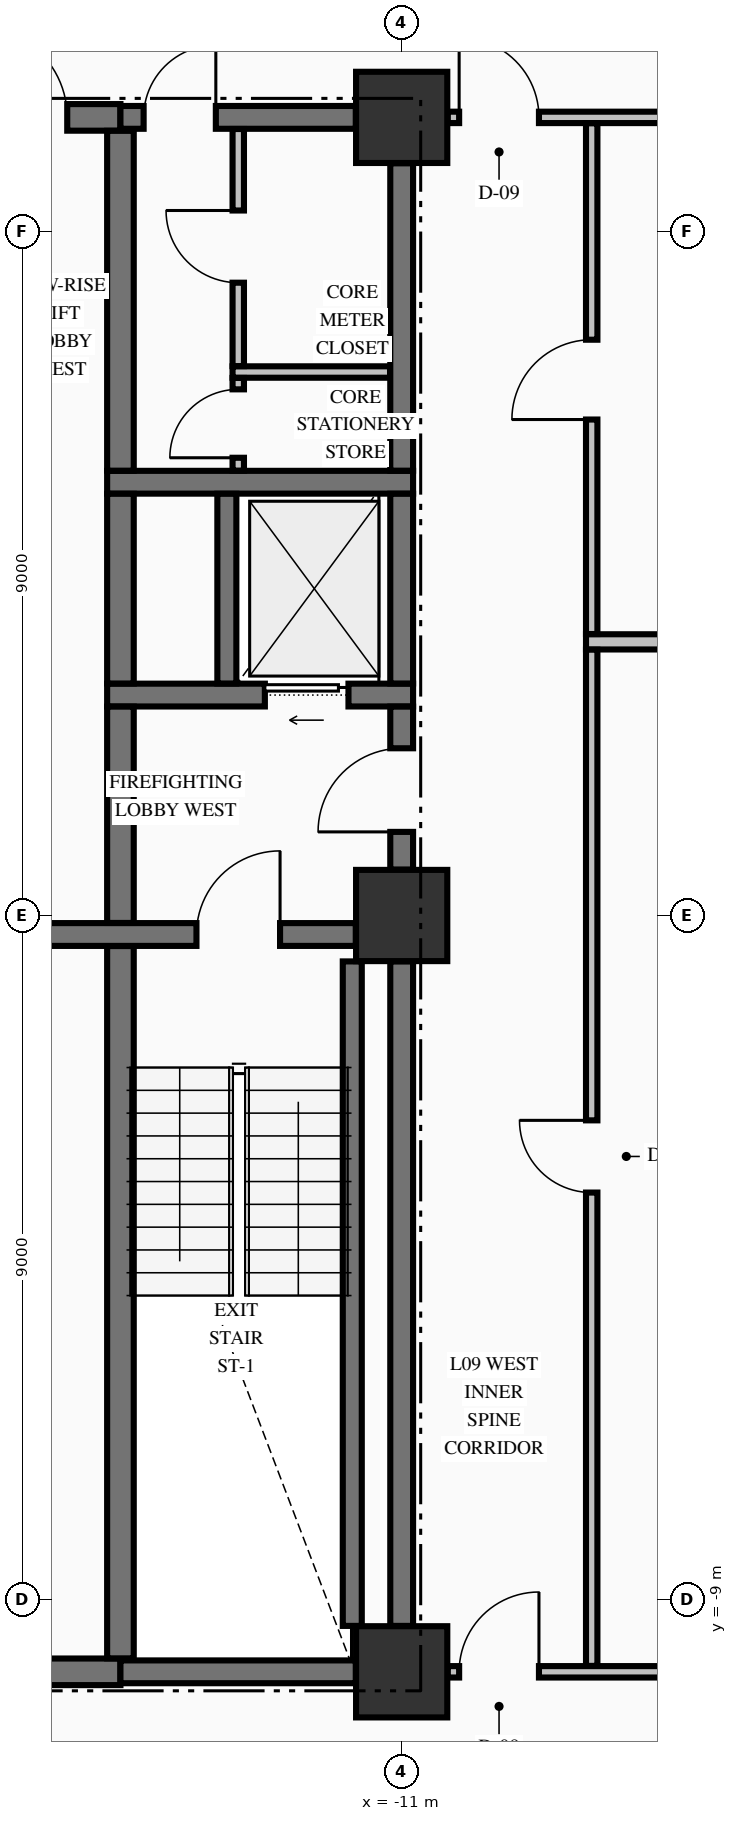
"""IFC4 building model, lengths in metres.
Left out: names, types, materials, properties, quantities, classifications, styles, units other than length and angle.
Written with IfcOpenShell. Run it as: python <this file> out.ifc"""

import sys

from ifc_helpers import new_model, si_unit, direction, frame, frame_2d, origin, origin_2d, place, context, subcontext, project, spatial, rectangle, extrude, element, fill, save


model = new_model("IFC4")
c1 = context("Model", 3, precision=1e-05, world=origin(), true_north=direction((0.0, 1.0)))
c2 = subcontext(c1, "Body", "Model", "MODEL_VIEW")
j1 = project(units=[si_unit("LENGTHUNIT", "METRE"), si_unit("PLANEANGLEUNIT", "RADIAN")], contexts=[c1])
p1 = place(None, origin())
s1 = spatial("IfcSite", under=j1, at=p1, CompositionType="ELEMENT")
p2 = place(p1, origin())
s2 = spatial("IfcBuilding", under=s1, at=p2, CompositionType="ELEMENT")
p3 = place(p2, frame((0.0, 0.0, 41.48)))
s3 = spatial("IfcBuildingStorey", under=s2, at=p3, CompositionType="ELEMENT", Elevation=41.48)
for number, where, z_axis, x_axis in (
    (1, (-11.0, -9.95, -0.25), (0.0, 0.0, 1.0), (1.0, 0.0, 0.0)),
    (2, (-11.0, 0.0, -0.25), (0.0, 0.0, 1.0), (1.0, 0.0, 0.0)),
    (3, (-11.0, 10.5, -0.25), (0.0, 0.0, 1.0), (1.0, 0.0, 0.0)),
):
    element("IfcColumn", number, at=place(p3, frame(where, z_axis=z_axis, x_axis=x_axis)), inside=s3, PredefinedType="COLUMN", context=c2, shape_type="SweptSolid", body=[
        extrude(rectangle(XDim=1.2, YDim=1.2, at=origin_2d()), origin(), (0.0, 0.0, 1.0), 3.57),
    ])
p4 = place(p3, frame((-19.396, -9.95, 0.0), z_axis=(0.0, 0.0, 1.0), x_axis=(1.0, 0.0, 0.0)))
e4 = element("IfcWall", 4, at=p4, inside=s3, PredefinedType="SHEAR", context=c2, shape_type="SweptSolid", body=[
    extrude(rectangle(XDim=4.696, YDim=0.35, at=frame_2d((2.348, 0.0))), origin(), (0.0, 0.0, 1.0), 3.32),
])
p5 = place(p4, frame((0.571, 0.0, 0.0)))
e5 = element("IfcOpeningElement", 5, at=p5, cuts=e4, PredefinedType="OPENING", context=c2, shape_type="SweptSolid", body=[
    extrude(rectangle(XDim=1.05, YDim=2.15, at=frame_2d((0.525, 1.075))), frame((0.0, 0.185, 0.0), z_axis=(0.0, -1.0, 0.0), x_axis=(1.0, 0.0, 0.0)), (0.0, 0.0, 1.0), 0.37),
])
p6 = place(p3, frame((-14.7, -9.95, 0.0), z_axis=(0.0, 0.0, 1.0), x_axis=(1.0, 0.0, 0.0)))
e6 = element("IfcWall", 6, at=p6, inside=s3, PredefinedType="SHEAR", context=c2, shape_type="SweptSolid", body=[
    extrude(rectangle(XDim=3.096, YDim=0.3, at=frame_2d((1.548, 0.0))), origin(), (0.0, 0.0, 1.0), 3.32),
])
p7 = place(p3, frame((-19.396, -0.25, 0.0), z_axis=(0.0, 0.0, 1.0), x_axis=(1.0, 0.0, 0.0)))
e7 = element("IfcWall", 7, at=p7, inside=s3, PredefinedType="SHEAR", context=c2, shape_type="SweptSolid", body=[
    extrude(rectangle(XDim=7.792, YDim=0.3, at=frame_2d((3.896, 0.0))), origin(), (0.0, 0.0, 1.0), 3.32),
])
p8 = place(p7, frame((5.696, 0.0, 0.0)))
e8 = element("IfcOpeningElement", 8, at=p8, cuts=e7, PredefinedType="OPENING", context=c2, shape_type="SweptSolid", body=[
    extrude(rectangle(XDim=1.1, YDim=2.15, at=frame_2d((0.55, 1.075))), frame((0.0, 0.16, 0.0), z_axis=(0.0, -1.0, 0.0), x_axis=(1.0, 0.0, 0.0)), (0.0, 0.0, 1.0), 0.32),
])
p9 = place(p3, frame((-14.875, 2.9, 0.0), z_axis=(0.0, 0.0, 1.0), x_axis=(1.0, 0.0, 0.0)))
e9 = element("IfcWall", 9, at=p9, inside=s3, PredefinedType="SHEAR", context=c2, shape_type="SweptSolid", body=[
    extrude(rectangle(XDim=4.025, YDim=0.3, at=frame_2d((2.012, 0.0))), origin(), (0.0, 0.0, 1.0), 3.32),
])
p10 = place(p9, frame((2.075, 0.0, 0.0)))
e10 = element("IfcOpeningElement", 10, at=p10, cuts=e9, PredefinedType="OPENING", context=c2, shape_type="SweptSolid", body=[
    extrude(rectangle(XDim=1.1, YDim=2.2, at=frame_2d((0.55, 1.1))), frame((0.0, 0.16, 0.0), z_axis=(0.0, -1.0, 0.0), x_axis=(1.0, 0.0, 0.0)), (0.0, 0.0, 1.0), 0.32),
])
p11 = place(p3, frame((-14.875, 5.7, 0.0), z_axis=(0.0, 0.0, 1.0), x_axis=(1.0, 0.0, 0.0)))
e11 = element("IfcWall", 11, at=p11, inside=s3, PredefinedType="SHEAR", context=c2, shape_type="SweptSolid", body=[
    extrude(rectangle(XDim=4.025, YDim=0.3, at=frame_2d((2.012, 0.0))), origin(), (0.0, 0.0, 1.0), 3.32),
])
p12 = place(p3, frame((-19.396, 10.5, 0.0), z_axis=(0.0, 0.0, 1.0), x_axis=(1.0, 0.0, 0.0)))
e12 = element("IfcWall", 12, at=p12, inside=s3, PredefinedType="SHEAR", context=c2, shape_type="SweptSolid", body=[
    extrude(rectangle(XDim=4.696, YDim=0.35, at=frame_2d((2.348, 0.0))), origin(), (0.0, 0.0, 1.0), 3.32),
])
p13 = place(p12, frame((2.796, 0.0, 0.0)))
e13 = element("IfcOpeningElement", 13, at=p13, cuts=e12, PredefinedType="OPENING", context=c2, shape_type="SweptSolid", body=[
    extrude(rectangle(XDim=1.2, YDim=2.15, at=frame_2d((0.6, 1.075))), frame((0.0, 0.185, 0.0), z_axis=(0.0, -1.0, 0.0), x_axis=(1.0, 0.0, 0.0)), (0.0, 0.0, 1.0), 0.37),
])
p14 = place(p3, frame((-14.7, 10.5, 0.0), z_axis=(0.0, 0.0, 1.0), x_axis=(1.0, 0.0, 0.0)))
e14 = element("IfcWall", 14, at=p14, inside=s3, PredefinedType="SHEAR", context=c2, shape_type="SweptSolid", body=[
    extrude(rectangle(XDim=3.096, YDim=0.3, at=frame_2d((1.548, 0.0))), origin(), (0.0, 0.0, 1.0), 3.32),
])
p15 = place(p14, frame((0.305, 0.0, 0.0)))
e15 = element("IfcOpeningElement", 15, at=p15, cuts=e14, PredefinedType="OPENING", context=c2, shape_type="SweptSolid", body=[
    extrude(rectangle(XDim=0.95, YDim=2.15, at=frame_2d((0.475, 1.075))), frame((0.0, 0.16, 0.0), z_axis=(0.0, -1.0, 0.0), x_axis=(1.0, 0.0, 0.0)), (0.0, 0.0, 1.0), 0.32),
])
p16 = place(p3, frame((-10.394, -9.95, 0.0), z_axis=(0.0, 0.0, 1.0), x_axis=(1.0, 0.0, 0.0)))
e16 = element("IfcWall", 16, at=p16, inside=s3, PredefinedType="PARTITIONING", context=c2, shape_type="SweptSolid", body=[
    extrude(rectangle(XDim=20.788, YDim=0.15, at=frame_2d((10.394, 0.0))), origin(), (0.0, 0.0, 1.0), 3.32),
])
p17 = place(p16, frame((0.15, 0.0, 0.0)))
e17 = element("IfcOpeningElement", 17, at=p17, cuts=e16, PredefinedType="OPENING", context=c2, shape_type="SweptSolid", body=[
    extrude(rectangle(XDim=1.05, YDim=2.15, at=frame_2d((0.525, 1.075))), frame((0.0, 0.085, 0.0), z_axis=(0.0, -1.0, 0.0), x_axis=(1.0, 0.0, 0.0)), (0.0, 0.0, 1.0), 0.17),
])
p18 = place(p16, frame((19.588, 0.0, 0.0)))
e18 = element("IfcOpeningElement", 18, at=p18, cuts=e16, PredefinedType="OPENING", context=c2, shape_type="SweptSolid", body=[
    extrude(rectangle(XDim=1.05, YDim=2.15, at=frame_2d((0.525, 1.075))), frame((0.0, 0.085, 0.0), z_axis=(0.0, -1.0, 0.0), x_axis=(1.0, 0.0, 0.0)), (0.0, 0.0, 1.0), 0.17),
])
p19 = place(p16, frame((12.669, 0.0, 0.0)))
e19 = element("IfcOpeningElement", 19, at=p19, cuts=e16, PredefinedType="OPENING", context=c2, shape_type="SweptSolid", body=[
    extrude(rectangle(XDim=0.95, YDim=2.15, at=frame_2d((0.475, 1.075))), frame((0.0, 0.085, 0.0), z_axis=(0.0, -1.0, 0.0), x_axis=(1.0, 0.0, 0.0)), (0.0, 0.0, 1.0), 0.17),
])
p20 = place(p3, frame((-8.575, 3.6, 0.0), z_axis=(0.0, 0.0, 1.0), x_axis=(1.0, 0.0, 0.0)))
e20 = element("IfcWall", 20, at=p20, inside=s3, PredefinedType="PARTITIONING", context=c2, shape_type="SweptSolid", body=[
    extrude(rectangle(XDim=8.675, YDim=0.2, at=frame_2d((4.337, 0.0))), origin(), (0.0, 0.0, 1.0), 3.32),
])
p21 = place(p3, frame((-13.225, 7.15, 0.0), z_axis=(0.0, 0.0, 1.0), x_axis=(1.0, 0.0, 0.0)))
e21 = element("IfcWall", 21, at=p21, inside=s3, PredefinedType="PARTITIONING", context=c2, shape_type="SweptSolid", body=[
    extrude(rectangle(XDim=2.072, YDim=0.15, at=frame_2d((1.036, 0.0))), origin(), (0.0, 0.0, 1.0), 3.32),
])
p22 = place(p3, frame((-10.394, 10.5, 0.0), z_axis=(0.0, 0.0, 1.0), x_axis=(1.0, 0.0, 0.0)))
e22 = element("IfcWall", 22, at=p22, inside=s3, PredefinedType="PARTITIONING", context=c2, shape_type="SweptSolid", body=[
    extrude(rectangle(XDim=20.788, YDim=0.15, at=frame_2d((10.394, 0.0))), origin(), (0.0, 0.0, 1.0), 3.32),
])
p23 = place(p22, frame((0.15, 0.0, 0.0)))
e23 = element("IfcOpeningElement", 23, at=p23, cuts=e22, PredefinedType="OPENING", context=c2, shape_type="SweptSolid", body=[
    extrude(rectangle(XDim=1.05, YDim=2.15, at=frame_2d((0.525, 1.075))), frame((0.0, 0.085, 0.0), z_axis=(0.0, -1.0, 0.0), x_axis=(1.0, 0.0, 0.0)), (0.0, 0.0, 1.0), 0.17),
])
p24 = place(p22, frame((19.588, 0.0, 0.0)))
e24 = element("IfcOpeningElement", 24, at=p24, cuts=e22, PredefinedType="OPENING", context=c2, shape_type="SweptSolid", body=[
    extrude(rectangle(XDim=1.05, YDim=2.15, at=frame_2d((0.525, 1.075))), frame((0.0, 0.085, 0.0), z_axis=(0.0, -1.0, 0.0), x_axis=(1.0, 0.0, 0.0)), (0.0, 0.0, 1.0), 0.17),
])
p25 = place(p3, frame((-14.7, -9.773, 0.0), z_axis=(0.0, 0.0, 1.0), x_axis=(0.0, 1.0, 0.0)))
e25 = element("IfcWall", 25, at=p25, inside=s3, PredefinedType="SHEAR", context=c2, shape_type="SweptSolid", body=[
    extrude(rectangle(XDim=9.371, YDim=0.35, at=frame_2d((4.686, 0.0))), origin(), (0.0, 0.0, 1.0), 3.32),
])
p26 = place(p3, frame((-14.7, -0.098, 0.0), z_axis=(0.0, 0.0, 1.0), x_axis=(0.0, 1.0, 0.0)))
e26 = element("IfcWall", 26, at=p26, inside=s3, PredefinedType="SHEAR", context=c2, shape_type="SweptSolid", body=[
    extrude(rectangle(XDim=2.846, YDim=0.35, at=frame_2d((1.423, 0.0))), origin(), (0.0, 0.0, 1.0), 3.32),
])
p27 = place(p3, frame((-14.7, 3.052, 0.0), z_axis=(0.0, 0.0, 1.0), x_axis=(0.0, 1.0, 0.0)))
e27 = element("IfcWall", 27, at=p27, inside=s3, PredefinedType="SHEAR", context=c2, shape_type="SweptSolid", body=[
    extrude(rectangle(XDim=2.496, YDim=0.35, at=frame_2d((1.248, 0.0))), origin(), (0.0, 0.0, 1.0), 3.32),
])
p28 = place(p3, frame((-14.7, 5.852, 0.0), z_axis=(0.0, 0.0, 1.0), x_axis=(0.0, 1.0, 0.0)))
e28 = element("IfcWall", 28, at=p28, inside=s3, PredefinedType="SHEAR", context=c2, shape_type="SweptSolid", body=[
    extrude(rectangle(XDim=4.471, YDim=0.35, at=frame_2d((2.235, 0.0))), origin(), (0.0, 0.0, 1.0), 3.32),
])
p29 = place(p3, frame((-13.3, 3.052, 0.0), z_axis=(0.0, 0.0, 1.0), x_axis=(0.0, 1.0, 0.0)))
e29 = element("IfcWall", 29, at=p29, inside=s3, PredefinedType="SOLIDWALL", context=c2, shape_type="SweptSolid", body=[
    extrude(rectangle(XDim=2.496, YDim=0.25, at=frame_2d((1.248, 0.0))), origin(), (0.0, 0.0, 1.0), 3.32),
])
p30 = place(p3, frame((-11.65, -9.346, 0.0), z_axis=(0.0, 0.0, 1.0), x_axis=(0.0, 1.0, 0.0)))
e30 = element("IfcWall", 30, at=p30, inside=s3, PredefinedType="SOLIDWALL", context=c2, shape_type="SweptSolid", body=[
    extrude(rectangle(XDim=8.742, YDim=0.25, at=frame_2d((4.371, 0.0))), origin(), (0.0, 0.0, 1.0), 3.32),
])
p31 = place(p3, frame((-11.0, -9.346, 0.0), z_axis=(0.0, 0.0, 1.0), x_axis=(0.0, 1.0, 0.0)))
e31 = element("IfcWall", 31, at=p31, inside=s3, PredefinedType="SHEAR", context=c2, shape_type="SweptSolid", body=[
    extrude(rectangle(XDim=8.742, YDim=0.3, at=frame_2d((4.371, 0.0))), origin(), (0.0, 0.0, 1.0), 3.32),
])
p32 = place(p3, frame((-11.0, 0.604, 0.0), z_axis=(0.0, 0.0, 1.0), x_axis=(0.0, 1.0, 0.0)))
e32 = element("IfcWall", 32, at=p32, inside=s3, PredefinedType="SHEAR", context=c2, shape_type="SweptSolid", body=[
    extrude(rectangle(XDim=2.144, YDim=0.3, at=frame_2d((1.072, 0.0))), origin(), (0.0, 0.0, 1.0), 3.32),
])
p33 = place(p32, frame((0.496, 0.0, 0.0)))
e33 = element("IfcOpeningElement", 33, at=p33, cuts=e32, PredefinedType="OPENING", context=c2, shape_type="SweptSolid", body=[
    extrude(rectangle(XDim=1.1, YDim=2.15, at=frame_2d((0.55, 1.075))), frame((0.0, 0.16, 0.0), z_axis=(0.0, -1.0, 0.0), x_axis=(1.0, 0.0, 0.0)), (0.0, 0.0, 1.0), 0.32),
])
p34 = place(p3, frame((-11.0, 3.052, 0.0), z_axis=(0.0, 0.0, 1.0), x_axis=(0.0, 1.0, 0.0)))
e34 = element("IfcWall", 34, at=p34, inside=s3, PredefinedType="SHEAR", context=c2, shape_type="SweptSolid", body=[
    extrude(rectangle(XDim=2.496, YDim=0.3, at=frame_2d((1.248, 0.0))), origin(), (0.0, 0.0, 1.0), 3.32),
])
p35 = place(p3, frame((-11.0, 5.852, 0.0), z_axis=(0.0, 0.0, 1.0), x_axis=(0.0, 1.0, 0.0)))
e35 = element("IfcWall", 35, at=p35, inside=s3, PredefinedType="SHEAR", context=c2, shape_type="SweptSolid", body=[
    extrude(rectangle(XDim=4.044, YDim=0.3, at=frame_2d((2.022, 0.0))), origin(), (0.0, 0.0, 1.0), 3.32),
])
p36 = place(p3, frame((-13.15, 5.853, 0.0), z_axis=(0.0, 0.0, 1.0), x_axis=(0.0, 1.0, 0.0)))
e36 = element("IfcWall", 36, at=p36, inside=s3, PredefinedType="PARTITIONING", context=c2, shape_type="SweptSolid", body=[
    extrude(rectangle(XDim=1.219, YDim=0.15, at=frame_2d((0.609, 0.0))), origin(), (0.0, 0.0, 1.0), 3.32),
])
p37 = place(p36, frame((0.169, 0.0, 0.0)))
e37 = element("IfcOpeningElement", 37, at=p37, cuts=e36, PredefinedType="OPENING", context=c2, shape_type="SweptSolid", body=[
    extrude(rectangle(XDim=0.9, YDim=2.15, at=frame_2d((0.45, 1.075))), frame((0.0, 0.085, 0.0), z_axis=(0.0, -1.0, 0.0), x_axis=(1.0, 0.0, 0.0)), (0.0, 0.0, 1.0), 0.17),
])
p38 = place(p3, frame((-13.15, 7.228, 0.0), z_axis=(0.0, 0.0, 1.0), x_axis=(0.0, 1.0, 0.0)))
e38 = element("IfcWall", 38, at=p38, inside=s3, PredefinedType="PARTITIONING", context=c2, shape_type="SweptSolid", body=[
    extrude(rectangle(XDim=3.119, YDim=0.15, at=frame_2d((1.56, 0.0))), origin(), (0.0, 0.0, 1.0), 3.32),
])
p39 = place(p38, frame((1.097, 0.0, 0.0)))
e39 = element("IfcOpeningElement", 39, at=p39, cuts=e38, PredefinedType="OPENING", context=c2, shape_type="SweptSolid", body=[
    extrude(rectangle(XDim=0.95, YDim=2.15, at=frame_2d((0.475, 1.075))), frame((0.0, 0.085, 0.0), z_axis=(0.0, -1.0, 0.0), x_axis=(1.0, 0.0, 0.0)), (0.0, 0.0, 1.0), 0.17),
])
p40 = place(p3, frame((-8.5, -9.872, 0.0), z_axis=(0.0, 0.0, 1.0), x_axis=(0.0, 1.0, 0.0)))
e40 = element("IfcWall", 40, at=p40, inside=s3, PredefinedType="PARTITIONING", context=c2, shape_type="SweptSolid", body=[
    extrude(rectangle(XDim=13.369, YDim=0.15, at=frame_2d((6.685, 0.0))), origin(), (0.0, 0.0, 1.0), 3.32),
])
p41 = place(p40, frame((6.227, 0.0, 0.0)))
e41 = element("IfcOpeningElement", 41, at=p41, cuts=e40, PredefinedType="OPENING", context=c2, shape_type="SweptSolid", body=[
    extrude(rectangle(XDim=0.95, YDim=2.15, at=frame_2d((0.475, 1.075))), frame((0.0, 0.085, 0.0), z_axis=(0.0, -1.0, 0.0), x_axis=(1.0, 0.0, 0.0)), (0.0, 0.0, 1.0), 0.17),
])
p42 = place(p3, frame((-8.5, 3.703, 0.0), z_axis=(0.0, 0.0, 1.0), x_axis=(0.0, 1.0, 0.0)))
e42 = element("IfcWall", 42, at=p42, inside=s3, PredefinedType="PARTITIONING", context=c2, shape_type="SweptSolid", body=[
    extrude(rectangle(XDim=6.719, YDim=0.15, at=frame_2d((3.36, 0.0))), origin(), (0.0, 0.0, 1.0), 3.32),
])
p43 = place(p42, frame((2.822, 0.0, 0.0)))
e43 = element("IfcOpeningElement", 43, at=p43, cuts=e42, PredefinedType="OPENING", context=c2, shape_type="SweptSolid", body=[
    extrude(rectangle(XDim=1.05, YDim=2.15, at=frame_2d((0.525, 1.075))), frame((0.0, 0.085, 0.0), z_axis=(0.0, -1.0, 0.0), x_axis=(1.0, 0.0, 0.0)), (0.0, 0.0, 1.0), 0.17),
])
p44 = place(p8, origin())
e44 = element("IfcDoor", 44, at=p44, inside=s3, OperationType="SINGLE_SWING_RIGHT", PredefinedType="DOOR", context=c2, shape_type="SweptSolid", body=[
    extrude(rectangle(XDim=1.1, YDim=2.15, at=frame_2d((0.55, 1.075))), frame((0.0, 0.025, 0.0), z_axis=(0.0, -1.0, 0.0), x_axis=(1.0, 0.0, 0.0)), (0.0, 0.0, 1.0), 0.05),
])
fill(e8, e44)
p45 = place(p33, origin())
e45 = element("IfcDoor", 45, at=p45, inside=s3, OperationType="SINGLE_SWING_LEFT", PredefinedType="DOOR", context=c2, shape_type="SweptSolid", body=[
    extrude(rectangle(XDim=1.1, YDim=2.15, at=frame_2d((0.55, 1.075))), frame((0.0, 0.025, 0.0), z_axis=(0.0, -1.0, 0.0), x_axis=(1.0, 0.0, 0.0)), (0.0, 0.0, 1.0), 0.05),
])
fill(e33, e45)
p46 = place(p10, origin())
e46 = element("IfcDoor", 46, at=p46, inside=s3, OperationType="SLIDING_TO_LEFT", PredefinedType="DOOR", context=c2, shape_type="SweptSolid", body=[
    extrude(rectangle(XDim=1.1, YDim=2.2, at=frame_2d((0.55, 1.1))), frame((0.0, 0.025, 0.0), z_axis=(0.0, -1.0, 0.0), x_axis=(1.0, 0.0, 0.0)), (0.0, 0.0, 1.0), 0.05),
])
fill(e10, e46)
p47 = place(p15, origin())
e47 = element("IfcDoor", 47, at=p47, inside=s3, OperationType="SINGLE_SWING_RIGHT", PredefinedType="DOOR", context=c2, shape_type="SweptSolid", body=[
    extrude(rectangle(XDim=0.95, YDim=2.15, at=frame_2d((0.475, 1.075))), frame((0.0, 0.025, 0.0), z_axis=(0.0, -1.0, 0.0), x_axis=(1.0, 0.0, 0.0)), (0.0, 0.0, 1.0), 0.05),
])
fill(e15, e47)
p48 = place(p37, origin())
e48 = element("IfcDoor", 48, at=p48, inside=s3, OperationType="SINGLE_SWING_LEFT", PredefinedType="DOOR", context=c2, shape_type="SweptSolid", body=[
    extrude(rectangle(XDim=0.9, YDim=2.15, at=frame_2d((0.45, 1.075))), frame((0.0, 0.025, 0.0), z_axis=(0.0, -1.0, 0.0), x_axis=(1.0, 0.0, 0.0)), (0.0, 0.0, 1.0), 0.05),
])
fill(e37, e48)
p49 = place(p39, origin())
e49 = element("IfcDoor", 49, at=p49, inside=s3, OperationType="SINGLE_SWING_RIGHT", PredefinedType="DOOR", context=c2, shape_type="SweptSolid", body=[
    extrude(rectangle(XDim=0.95, YDim=2.15, at=frame_2d((0.475, 1.075))), frame((0.0, 0.025, 0.0), z_axis=(0.0, -1.0, 0.0), x_axis=(1.0, 0.0, 0.0)), (0.0, 0.0, 1.0), 0.05),
])
fill(e39, e49)
p50 = place(p13, origin())
e50 = element("IfcDoor", 50, at=p50, inside=s3, OperationType="SINGLE_SWING_LEFT", PredefinedType="DOOR", context=c2, shape_type="SweptSolid", body=[
    extrude(rectangle(XDim=1.2, YDim=2.15, at=frame_2d((0.6, 1.075))), frame((0.0, 0.025, 0.0), z_axis=(0.0, -1.0, 0.0), x_axis=(1.0, 0.0, 0.0)), (0.0, 0.0, 1.0), 0.05),
])
fill(e13, e50)
p51 = place(p23, origin())
e51 = element("IfcDoor", 51, at=p51, inside=s3, OperationType="SINGLE_SWING_LEFT", PredefinedType="DOOR", context=c2, shape_type="SweptSolid", body=[
    extrude(rectangle(XDim=1.05, YDim=2.15, at=frame_2d((0.525, 1.075))), frame((0.0, 0.025, 0.0), z_axis=(0.0, -1.0, 0.0), x_axis=(1.0, 0.0, 0.0)), (0.0, 0.0, 1.0), 0.05),
])
fill(e23, e51)
p52 = place(p17, origin())
e52 = element("IfcDoor", 52, at=p52, inside=s3, OperationType="SINGLE_SWING_RIGHT", PredefinedType="DOOR", context=c2, shape_type="SweptSolid", body=[
    extrude(rectangle(XDim=1.05, YDim=2.15, at=frame_2d((0.525, 1.075))), frame((0.0, 0.025, 0.0), z_axis=(0.0, -1.0, 0.0), x_axis=(1.0, 0.0, 0.0)), (0.0, 0.0, 1.0), 0.05),
])
fill(e17, e52)
p53 = place(p43, origin())
e53 = element("IfcDoor", 53, at=p53, inside=s3, OperationType="SINGLE_SWING_LEFT", PredefinedType="DOOR", context=c2, shape_type="SweptSolid", body=[
    extrude(rectangle(XDim=1.05, YDim=2.15, at=frame_2d((0.525, 1.075))), frame((0.0, 0.025, 0.0), z_axis=(0.0, -1.0, 0.0), x_axis=(1.0, 0.0, 0.0)), (0.0, 0.0, 1.0), 0.05),
])
fill(e43, e53)
p54 = place(p41, origin())
e54 = element("IfcDoor", 54, at=p54, inside=s3, OperationType="SINGLE_SWING_RIGHT", PredefinedType="DOOR", context=c2, shape_type="SweptSolid", body=[
    extrude(rectangle(XDim=0.95, YDim=2.15, at=frame_2d((0.475, 1.075))), frame((0.0, 0.025, 0.0), z_axis=(0.0, -1.0, 0.0), x_axis=(1.0, 0.0, 0.0)), (0.0, 0.0, 1.0), 0.05),
])
fill(e41, e54)
save(model, sys.argv[1])
